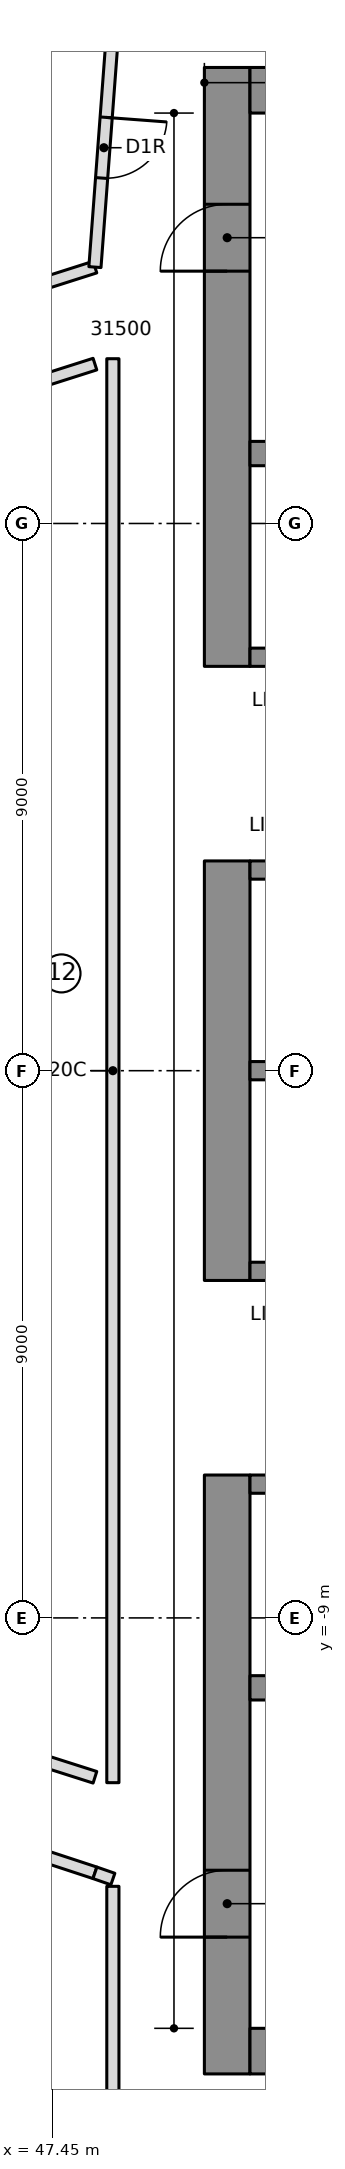
"""IFC4 building model, lengths in metres.
Left out: names, types, materials, properties, quantities, classifications, styles, units other than length and angle.
Written with IfcOpenShell. Run it as: python <this file> out.ifc"""

import sys

from ifc_helpers import new_model, si_unit, direction, frame, frame_2d, origin, place, context, subcontext, project, spatial, rectangle, extrude, element, fill, save


model = new_model("IFC4")
c1 = context("Model", 3, precision=1e-05, world=origin(), true_north=direction((0.0, 1.0)))
c2 = subcontext(c1, "Body", "Model", "MODEL_VIEW")
j1 = project(units=[si_unit("LENGTHUNIT", "METRE"), si_unit("PLANEANGLEUNIT", "RADIAN")], contexts=[c1])
p1 = place(None, origin())
s1 = spatial("IfcSite", under=j1, at=p1, CompositionType="ELEMENT")
p2 = place(p1, origin())
s2 = spatial("IfcBuilding", under=s1, at=p2, CompositionType="ELEMENT")
p3 = place(p2, frame((0.0, 0.0, 200.35)))
s3 = spatial("IfcBuildingStorey", under=s2, at=p3, CompositionType="ELEMENT", Elevation=200.35)
p4 = place(p3, frame((50.325, 6.65, 0.0), z_axis=(0.0, 0.0, 1.0), x_axis=(0.0, 1.0, 0.0)))
e1 = element("IfcWall", 1, at=p4, inside=s3, PredefinedType="SHEAR", context=c2, shape_type="SweptSolid", body=[
    extrude(rectangle(XDim=9.85, YDim=0.75, at=frame_2d((4.925, 0.0))), origin(), (0.0, 0.0, 1.0), 3.55),
])
p5 = place(p4, frame((6.5, 0.0, 0.0)))
e2 = element("IfcOpeningElement", 2, at=p5, cuts=e1, PredefinedType="OPENING", context=c2, shape_type="SweptSolid", body=[
    extrude(rectangle(XDim=1.1, YDim=2.1, at=frame_2d((0.55, 1.05))), frame((0.0, 0.385, 0.0), z_axis=(0.0, -1.0, 0.0), x_axis=(1.0, 0.0, 0.0)), (0.0, 0.0, 1.0), 0.77),
])
p6 = place(p3, frame((50.325, -3.45, 0.0), z_axis=(0.0, 0.0, 1.0), x_axis=(0.0, 1.0, 0.0)))
e3 = element("IfcWall", 3, at=p6, inside=s3, PredefinedType="SHEAR", context=c2, shape_type="SweptSolid", body=[
    extrude(rectangle(XDim=6.9, YDim=0.75, at=frame_2d((3.45, 0.0))), origin(), (0.0, 0.0, 1.0), 3.55),
])
p7 = place(p3, frame((50.325, -16.5, 0.0), z_axis=(0.0, 0.0, 1.0), x_axis=(0.0, 1.0, 0.0)))
e4 = element("IfcWall", 4, at=p7, inside=s3, PredefinedType="SHEAR", context=c2, shape_type="SweptSolid", body=[
    extrude(rectangle(XDim=9.85, YDim=0.75, at=frame_2d((4.925, 0.0))), origin(), (0.0, 0.0, 1.0), 3.55),
])
p8 = place(p7, frame((2.25, 0.0, 0.0)))
e5 = element("IfcOpeningElement", 5, at=p8, cuts=e4, PredefinedType="OPENING", context=c2, shape_type="SweptSolid", body=[
    extrude(rectangle(XDim=1.1, YDim=2.1, at=frame_2d((0.55, 1.05))), frame((0.0, 0.385, 0.0), z_axis=(0.0, -1.0, 0.0), x_axis=(1.0, 0.0, 0.0)), (0.0, 0.0, 1.0), 0.77),
])
for number, where, z_axis, x_axis in (
    (6, (50.7, 16.125, 0.0), (0.0, 0.0, 1.0), (1.0, 0.0, 0.0)),
    (7, (50.7, -16.125, 0.0), (0.0, 0.0, 1.0), (1.0, 0.0, 0.0)),
):
    element("IfcWall", number, at=place(p3, frame(where, z_axis=z_axis, x_axis=x_axis)), inside=s3, PredefinedType="SHEAR", context=c2, shape_type="SweptSolid", body=[
        extrude(rectangle(XDim=13.77, YDim=0.75, at=frame_2d((6.885, 0.0))), origin(), (0.0, 0.0, 1.0), 3.55),
    ])
p9 = place(p3, frame((50.7, 10.15, 0.0), z_axis=(0.0, 0.0, 1.0), x_axis=(1.0, 0.0, 0.0)))
e8 = element("IfcWall", 8, at=p9, inside=s3, PredefinedType="SHEAR", context=c2, shape_type="SweptSolid", body=[
    extrude(rectangle(XDim=13.02, YDim=0.4, at=frame_2d((6.51, 0.0))), origin(), (0.0, 0.0, 1.0), 3.55),
])
p10 = place(p9, frame((0.7, 0.0, 0.0)))
e9 = element("IfcOpeningElement", 9, at=p10, cuts=e8, PredefinedType="OPENING", context=c2, shape_type="SweptSolid", body=[
    extrude(rectangle(XDim=1.1, YDim=2.1, at=frame_2d((0.55, 1.05))), frame((0.0, 0.21, 0.0), z_axis=(0.0, -1.0, 0.0), x_axis=(1.0, 0.0, 0.0)), (0.0, 0.0, 1.0), 0.42),
])
p11 = place(p9, frame((3.5, 0.0, 0.0)))
e10 = element("IfcOpeningElement", 10, at=p11, cuts=e8, PredefinedType="OPENING", context=c2, shape_type="SweptSolid", body=[
    extrude(rectangle(XDim=1.1, YDim=2.1, at=frame_2d((0.55, 1.05))), frame((0.0, 0.21, 0.0), z_axis=(0.0, -1.0, 0.0), x_axis=(1.0, 0.0, 0.0)), (0.0, 0.0, 1.0), 0.42),
])
p12 = place(p3, frame((50.7, -10.15, 0.0), z_axis=(0.0, 0.0, 1.0), x_axis=(1.0, 0.0, 0.0)))
e11 = element("IfcWall", 11, at=p12, inside=s3, PredefinedType="SHEAR", context=c2, shape_type="SweptSolid", body=[
    extrude(rectangle(XDim=13.02, YDim=0.4, at=frame_2d((6.51, 0.0))), origin(), (0.0, 0.0, 1.0), 3.55),
])
p13 = place(p3, frame((50.7, 0.0, 0.0), z_axis=(0.0, 0.0, 1.0), x_axis=(1.0, 0.0, 0.0)))
e12 = element("IfcWall", 12, at=p13, inside=s3, PredefinedType="SHEAR", context=c2, shape_type="SweptSolid", body=[
    extrude(rectangle(XDim=10.9, YDim=0.3, at=frame_2d((5.45, 0.0))), origin(), (0.0, 0.0, 1.0), 3.55),
])
p14 = place(p3, frame((50.7, 3.3, 0.0), z_axis=(0.0, 0.0, 1.0), x_axis=(1.0, 0.0, 0.0)))
e13 = element("IfcWall", 13, at=p14, inside=s3, PredefinedType="SHEAR", context=c2, shape_type="SweptSolid", body=[
    extrude(rectangle(XDim=10.9, YDim=0.3, at=frame_2d((5.45, 0.0))), origin(), (0.0, 0.0, 1.0), 3.55),
])
p15 = place(p14, frame((0.7, 0.0, 0.0)))
e14 = element("IfcOpeningElement", 14, at=p15, cuts=e13, PredefinedType="OPENING", context=c2, shape_type="SweptSolid", body=[
    extrude(rectangle(XDim=1.1, YDim=2.1, at=frame_2d((0.55, 1.05))), frame((0.0, 0.16, 0.0), z_axis=(0.0, -1.0, 0.0), x_axis=(1.0, 0.0, 0.0)), (0.0, 0.0, 1.0), 0.32),
])
p16 = place(p14, frame((3.5, 0.0, 0.0)))
e15 = element("IfcOpeningElement", 15, at=p16, cuts=e13, PredefinedType="OPENING", context=c2, shape_type="SweptSolid", body=[
    extrude(rectangle(XDim=1.1, YDim=2.1, at=frame_2d((0.55, 1.05))), frame((0.0, 0.16, 0.0), z_axis=(0.0, -1.0, 0.0), x_axis=(1.0, 0.0, 0.0)), (0.0, 0.0, 1.0), 0.32),
])
p17 = place(p14, frame((6.3, 0.0, 0.0)))
e16 = element("IfcOpeningElement", 16, at=p17, cuts=e13, PredefinedType="OPENING", context=c2, shape_type="SweptSolid", body=[
    extrude(rectangle(XDim=1.1, YDim=2.1, at=frame_2d((0.55, 1.05))), frame((0.0, 0.16, 0.0), z_axis=(0.0, -1.0, 0.0), x_axis=(1.0, 0.0, 0.0)), (0.0, 0.0, 1.0), 0.32),
])
p18 = place(p14, frame((9.1, 0.0, 0.0)))
e17 = element("IfcOpeningElement", 17, at=p18, cuts=e13, PredefinedType="OPENING", context=c2, shape_type="SweptSolid", body=[
    extrude(rectangle(XDim=1.1, YDim=2.1, at=frame_2d((0.55, 1.05))), frame((0.0, 0.16, 0.0), z_axis=(0.0, -1.0, 0.0), x_axis=(1.0, 0.0, 0.0)), (0.0, 0.0, 1.0), 0.32),
])
p19 = place(p3, frame((50.7, 6.8, 0.0), z_axis=(0.0, 0.0, 1.0), x_axis=(1.0, 0.0, 0.0)))
e18 = element("IfcWall", 18, at=p19, inside=s3, PredefinedType="SHEAR", context=c2, shape_type="SweptSolid", body=[
    extrude(rectangle(XDim=10.9, YDim=0.3, at=frame_2d((5.45, 0.0))), origin(), (0.0, 0.0, 1.0), 3.55),
])
p20 = place(p19, frame((6.4, 0.0, 0.0)))
e19 = element("IfcOpeningElement", 19, at=p20, cuts=e18, PredefinedType="OPENING", context=c2, shape_type="SweptSolid", body=[
    extrude(rectangle(XDim=0.9, YDim=2.1, at=frame_2d((0.45, 1.05))), frame((0.0, 0.16, 0.0), z_axis=(0.0, -1.0, 0.0), x_axis=(1.0, 0.0, 0.0)), (0.0, 0.0, 1.0), 0.32),
])
p21 = place(p19, frame((9.2, 0.0, 0.0)))
e20 = element("IfcOpeningElement", 20, at=p21, cuts=e18, PredefinedType="OPENING", context=c2, shape_type="SweptSolid", body=[
    extrude(rectangle(XDim=0.9, YDim=2.1, at=frame_2d((0.45, 1.05))), frame((0.0, 0.16, 0.0), z_axis=(0.0, -1.0, 0.0), x_axis=(1.0, 0.0, 0.0)), (0.0, 0.0, 1.0), 0.32),
])
p22 = place(p3, frame((50.7, -3.3, 0.0), z_axis=(0.0, 0.0, 1.0), x_axis=(1.0, 0.0, 0.0)))
e21 = element("IfcWall", 21, at=p22, inside=s3, PredefinedType="SHEAR", context=c2, shape_type="SweptSolid", body=[
    extrude(rectangle(XDim=10.9, YDim=0.3, at=frame_2d((5.45, 0.0))), origin(), (0.0, 0.0, 1.0), 3.55),
])
p23 = place(p22, frame((9.1, 0.0, 0.0)))
e22 = element("IfcOpeningElement", 22, at=p23, cuts=e21, PredefinedType="OPENING", context=c2, shape_type="SweptSolid", body=[
    extrude(rectangle(XDim=1.1, YDim=2.1, at=frame_2d((0.55, 1.05))), frame((0.0, 0.16, 0.0), z_axis=(0.0, -1.0, 0.0), x_axis=(1.0, 0.0, 0.0)), (0.0, 0.0, 1.0), 0.32),
])
p24 = place(p3, frame((50.7, -6.8, 0.0), z_axis=(0.0, 0.0, 1.0), x_axis=(1.0, 0.0, 0.0)))
e23 = element("IfcWall", 23, at=p24, inside=s3, PredefinedType="SHEAR", context=c2, shape_type="SweptSolid", body=[
    extrude(rectangle(XDim=10.9, YDim=0.3, at=frame_2d((5.45, 0.0))), origin(), (0.0, 0.0, 1.0), 3.55),
])
p25 = place(p24, frame((6.3, 0.0, 0.0)))
e24 = element("IfcOpeningElement", 24, at=p25, cuts=e23, PredefinedType="OPENING", context=c2, shape_type="SweptSolid", body=[
    extrude(rectangle(XDim=1.1, YDim=2.1, at=frame_2d((0.55, 1.05))), frame((0.0, 0.16, 0.0), z_axis=(0.0, -1.0, 0.0), x_axis=(1.0, 0.0, 0.0)), (0.0, 0.0, 1.0), 0.32),
])
p26 = place(p24, frame((9.1, 0.0, 0.0)))
e25 = element("IfcOpeningElement", 25, at=p26, cuts=e23, PredefinedType="OPENING", context=c2, shape_type="SweptSolid", body=[
    extrude(rectangle(XDim=1.1, YDim=2.1, at=frame_2d((0.55, 1.05))), frame((0.0, 0.16, 0.0), z_axis=(0.0, -1.0, 0.0), x_axis=(1.0, 0.0, 0.0)), (0.0, 0.0, 1.0), 0.32),
])
p27 = place(p24, frame((0.8, 0.0, 0.0)))
e26 = element("IfcOpeningElement", 26, at=p27, cuts=e23, PredefinedType="OPENING", context=c2, shape_type="SweptSolid", body=[
    extrude(rectangle(XDim=0.9, YDim=2.1, at=frame_2d((0.45, 1.05))), frame((0.0, 0.16, 0.0), z_axis=(0.0, -1.0, 0.0), x_axis=(1.0, 0.0, 0.0)), (0.0, 0.0, 1.0), 0.32),
])
p28 = place(p24, frame((3.6, 0.0, 0.0)))
e27 = element("IfcOpeningElement", 27, at=p28, cuts=e23, PredefinedType="OPENING", context=c2, shape_type="SweptSolid", body=[
    extrude(rectangle(XDim=0.9, YDim=2.1, at=frame_2d((0.45, 1.05))), frame((0.0, 0.16, 0.0), z_axis=(0.0, -1.0, 0.0), x_axis=(1.0, 0.0, 0.0)), (0.0, 0.0, 1.0), 0.32),
])
p29 = place(p3, frame((48.15, 13.217, 0.0), z_axis=(0.0, 0.0, 1.0), x_axis=(-0.952731090451, -0.303814860215, 0.0)))
e28 = element("IfcWall", 28, at=p29, inside=s3, PredefinedType="PARTITIONING", context=c2, shape_type="SweptSolid", body=[
    extrude(rectangle(XDim=1.088, YDim=0.2, at=frame_2d((0.544, 0.0))), origin(), (0.0, 0.0, 1.0), 3.25),
])
p30 = place(p3, frame((43.026, -11.507, 0.0), z_axis=(0.0, 0.0, 1.0), x_axis=(0.949951949432, -0.312396052744, 0.0)))
e29 = element("IfcWall", 29, at=p30, inside=s3, PredefinedType="PARTITIONING", context=c2, shape_type="SweptSolid", body=[
    extrude(rectangle(XDim=5.394, YDim=0.2, at=frame_2d((2.697, 0.0))), origin(), (0.0, 0.0, 1.0), 3.25),
])
p31 = place(p30, frame((3.05, 0.0, 0.0)))
e30 = element("IfcOpeningElement", 30, at=p31, cuts=e29, PredefinedType="OPENING", context=c2, shape_type="SweptSolid", body=[
    extrude(rectangle(XDim=1.5, YDim=2.1, at=frame_2d((0.75, 1.05))), frame((0.0, 0.11, 0.0), z_axis=(0.0, -1.0, 0.0), x_axis=(1.0, 0.0, 0.0)), (0.0, 0.0, 1.0), 0.22),
])
for number, where, z_axis, x_axis in (
    (31, (46.881, 11.217, 0.0), (0.0, 0.0, 1.0), (0.953, 0.304, 0.0)),
    (32, (48.15, -11.621, 0.0), (0.0, 0.0, 1.0), (-0.953, 0.304, 0.0)),
):
    element("IfcWall", number, at=place(p3, frame(where, z_axis=z_axis, x_axis=x_axis)), inside=s3, PredefinedType="PARTITIONING", context=c2, shape_type="SweptSolid", body=[
        extrude(rectangle(XDim=1.332, YDim=0.2, at=frame_2d((0.666, 0.0))), origin(), (0.0, 0.0, 1.0), 3.25),
    ])
p32 = place(p3, frame((48.445, 17.145, 0.0), z_axis=(0.0, 0.0, 1.0), x_axis=(-0.074933243819, -0.997188552366, 0.0)))
e33 = element("IfcWall", 33, at=p32, inside=s3, PredefinedType="PARTITIONING", context=c2, shape_type="SweptSolid", body=[
    extrude(rectangle(XDim=3.939, YDim=0.2, at=frame_2d((1.969, 0.0))), origin(), (0.0, 0.0, 1.0), 3.25),
])
p33 = place(p32, frame((1.47, 0.0, 0.0)))
e34 = element("IfcOpeningElement", 34, at=p33, cuts=e33, PredefinedType="OPENING", context=c2, shape_type="SweptSolid", body=[
    extrude(rectangle(XDim=1.0, YDim=2.1, at=frame_2d((0.5, 1.05))), frame((0.0, 0.11, 0.0), z_axis=(0.0, -1.0, 0.0), x_axis=(1.0, 0.0, 0.0)), (0.0, 0.0, 1.0), 0.22),
])
p34 = place(p3, frame((48.445, 11.71, 0.0), z_axis=(0.0, 0.0, 1.0), x_axis=(0.0, -1.0, 0.0)))
e35 = element("IfcWall", 35, at=p34, inside=s3, PredefinedType="PARTITIONING", context=c2, shape_type="SweptSolid", body=[
    extrude(rectangle(XDim=23.42, YDim=0.2, at=frame_2d((11.71, 0.0))), origin(), (0.0, 0.0, 1.0), 3.25),
])
p35 = place(p3, frame((48.15, -13.192, 0.0), z_axis=(0.0, 0.0, 1.0), x_axis=(0.944623214561, -0.328156947987, 0.0)))
e36 = element("IfcWall", 36, at=p35, inside=s3, PredefinedType="PARTITIONING", context=c2, shape_type="SweptSolid", body=[
    extrude(rectangle(XDim=0.312, YDim=0.2, at=frame_2d((0.156, 0.0))), origin(), (0.0, 0.0, 1.0), 3.25),
])
p36 = place(p3, frame((48.445, -13.415, 0.0), z_axis=(0.0, 0.0, 1.0), x_axis=(3.5195157e-05, -0.999999999381, 0.0)))
e37 = element("IfcWall", 37, at=p36, inside=s3, PredefinedType="PARTITIONING", context=c2, shape_type="SweptSolid", body=[
    extrude(rectangle(XDim=6.937, YDim=0.2, at=frame_2d((3.468, 0.0))), origin(), (0.0, 0.0, 1.0), 3.25),
])
p37 = place(p33, origin())
e38 = element("IfcDoor", 38, at=p37, inside=s3, OperationType="SINGLE_SWING_RIGHT", PredefinedType="DOOR", context=c2, shape_type="SweptSolid", body=[
    extrude(rectangle(XDim=1.0, YDim=2.1, at=frame_2d((0.5, 1.05))), frame((0.0, 0.025, 0.0), z_axis=(0.0, -1.0, 0.0), x_axis=(1.0, 0.0, 0.0)), (0.0, 0.0, 1.0), 0.05),
])
fill(e34, e38)
p38 = place(p5, origin())
e39 = element("IfcDoor", 39, at=p38, inside=s3, OperationType="SINGLE_SWING_RIGHT", PredefinedType="DOOR", context=c2, shape_type="SweptSolid", body=[
    extrude(rectangle(XDim=1.1, YDim=2.1, at=frame_2d((0.55, 1.05))), frame((0.0, 0.025, 0.0), z_axis=(0.0, -1.0, 0.0), x_axis=(1.0, 0.0, 0.0)), (0.0, 0.0, 1.0), 0.05),
])
fill(e2, e39)
p39 = place(p8, origin())
e40 = element("IfcDoor", 40, at=p39, inside=s3, OperationType="SINGLE_SWING_RIGHT", PredefinedType="DOOR", context=c2, shape_type="SweptSolid", body=[
    extrude(rectangle(XDim=1.1, YDim=2.1, at=frame_2d((0.55, 1.05))), frame((0.0, 0.025, 0.0), z_axis=(0.0, -1.0, 0.0), x_axis=(1.0, 0.0, 0.0)), (0.0, 0.0, 1.0), 0.05),
])
fill(e5, e40)
save(model, sys.argv[1])
